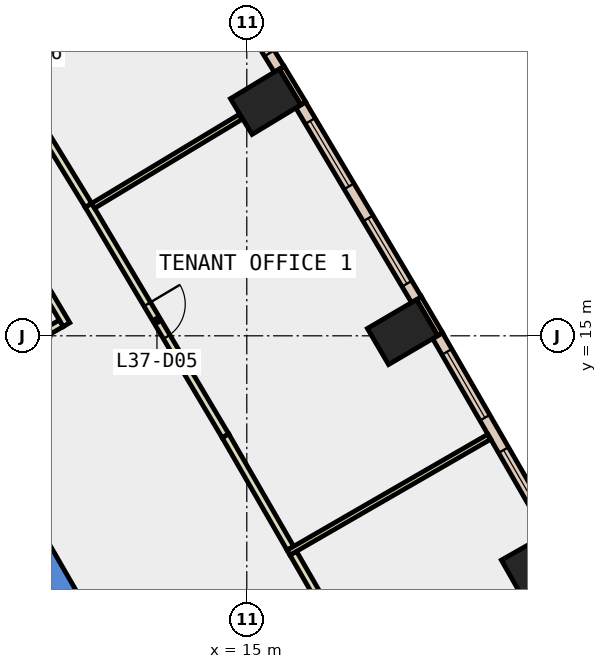
"""IFC4 building model, lengths in metres.
Left out: names, types, materials, properties, quantities, classifications, styles, units other than length and angle.
Written with IfcOpenShell. Run it as: python <this file> out.ifc"""

import sys

from ifc_helpers import new_model, si_unit, direction, frame, frame_2d, origin, origin_2d, place, context, subcontext, project, spatial, polyline, rectangle, outline, extrude, element, fill, save


model = new_model("IFC4")
c1 = context("Model", 3, precision=1e-05, world=origin(), true_north=direction((0.0, 1.0)))
c2 = subcontext(c1, "Body", "Model", "MODEL_VIEW")
j1 = project(units=[si_unit("LENGTHUNIT", "METRE"), si_unit("PLANEANGLEUNIT", "RADIAN")], contexts=[c1])
p1 = place(None, origin())
s1 = spatial("IfcSite", under=j1, at=p1, CompositionType="ELEMENT")
p2 = place(p1, origin())
s2 = spatial("IfcBuilding", under=s1, at=p2, CompositionType="ELEMENT")
p3 = place(p2, frame((0.0, 0.0, 167.6)))
s3 = spatial("IfcBuildingStorey", under=s2, at=p3, CompositionType="ELEMENT", Elevation=167.6)
for number, where, z_axis, x_axis in (
    (1, (22.623, 8.991, -0.4), (0.0, 0.0, 1.0), (-0.494, 0.869, 0.0)),
    (2, (19.099, 15.098, -0.4), (0.0, 0.0, 1.0), (-0.506, 0.863, 0.0)),
    (3, (15.496, 21.158, -0.4), (0.0, 0.0, 1.0), (-0.518, 0.855, 0.0)),
):
    element("IfcColumn", number, at=place(p3, frame(where, z_axis=z_axis, x_axis=x_axis)), inside=s3, PredefinedType="COLUMN", context=c2, shape_type="SweptSolid", body=[
        extrude(rectangle(XDim=1.1, YDim=1.5, at=origin_2d()), origin(), (0.0, 0.0, 1.0), 4.2),
    ])
p4 = place(p3, frame((0.0, 0.0, -0.4)))
e4 = element("IfcWall", 4, at=p4, inside=s3, PredefinedType="SHEAR", context=c2, shape_type="SweptSolid", body=[
    extrude(outline(polyline([(8.517, 11.748), (7.824, 11.348), (12.933, 2.5), (13.856, 2.5), (8.517, 11.748)])), origin(), (0.0, 0.0, 1.0), 4.2),
])
p5 = place(p3, frame((20.089, 15.041, 0.0), z_axis=(0.0, 0.0, 1.0), x_axis=(-0.50667077411, 0.862139621327, 0.0)))
e5 = element("IfcWall", 5, at=p5, inside=s3, PredefinedType="STANDARD", context=c2, shape_type="SweptSolid", body=[
    extrude(rectangle(XDim=1.1, YDim=0.15, at=frame_2d((0.55, 0.0))), origin(), (0.0, 0.0, 1.0), 3.8),
])
p6 = place(p3, frame((16.487, 21.115, 0.0), z_axis=(0.0, 0.0, 1.0), x_axis=(-0.518178754102, 0.855272341888, 0.0)))
e6 = element("IfcWall", 6, at=p6, inside=s3, PredefinedType="STANDARD", context=c2, shape_type="SweptSolid", body=[
    extrude(rectangle(XDim=1.1, YDim=0.15, at=frame_2d((0.55, 0.0))), origin(), (0.0, 0.0, 1.0), 3.8),
])
p7 = place(p3, frame((23.001, 9.837, 0.0), z_axis=(0.0, 0.0, 1.0), x_axis=(-0.49986421087, 0.866103787482, 0.0)))
e7 = element("IfcWall", 7, at=p7, inside=s3, PredefinedType="STANDARD", context=c2, shape_type="SweptSolid", body=[
    extrude(rectangle(XDim=5.964, YDim=0.3, at=frame_2d((2.982, 0.0))), origin(), (0.0, 0.0, 1.0), 3.8),
])
p8 = place(p7, frame((0.491, 0.0, 0.9)))
e8 = element("IfcOpeningElement", 8, at=p8, cuts=e7, PredefinedType="OPENING", context=c2, shape_type="SweptSolid", body=[
    extrude(rectangle(XDim=2.0, YDim=2.6, at=frame_2d((1.0, 1.3))), frame((0.0, 0.16, 0.0), z_axis=(0.0, -1.0, 0.0), x_axis=(1.0, 0.0, 0.0)), (0.0, 0.0, 1.0), 0.32),
])
p9 = place(p7, frame((3.473, 0.0, 0.9)))
e9 = element("IfcOpeningElement", 9, at=p9, cuts=e7, PredefinedType="OPENING", context=c2, shape_type="SweptSolid", body=[
    extrude(rectangle(XDim=2.0, YDim=2.6, at=frame_2d((1.0, 1.3))), frame((0.0, 0.16, 0.0), z_axis=(0.0, -1.0, 0.0), x_axis=(1.0, 0.0, 0.0)), (0.0, 0.0, 1.0), 0.32),
])
p10 = place(p3, frame((19.465, 15.949, 0.0), z_axis=(0.0, 0.0, 1.0), x_axis=(-0.511053317394, 0.8595490136, 0.0)))
e10 = element("IfcWall", 10, at=p10, inside=s3, PredefinedType="STANDARD", context=c2, shape_type="SweptSolid", body=[
    extrude(rectangle(XDim=5.962, YDim=0.3, at=frame_2d((2.981, 0.0))), origin(), (0.0, 0.0, 1.0), 3.8),
])
p11 = place(p10, frame((0.491, 0.0, 0.9)))
e11 = element("IfcOpeningElement", 11, at=p11, cuts=e10, PredefinedType="OPENING", context=c2, shape_type="SweptSolid", body=[
    extrude(rectangle(XDim=2.0, YDim=2.6, at=frame_2d((1.0, 1.3))), frame((0.0, 0.16, 0.0), z_axis=(0.0, -1.0, 0.0), x_axis=(1.0, 0.0, 0.0)), (0.0, 0.0, 1.0), 0.32),
])
p12 = place(p10, frame((3.472, 0.0, 0.9)))
e12 = element("IfcOpeningElement", 12, at=p12, cuts=e10, PredefinedType="OPENING", context=c2, shape_type="SweptSolid", body=[
    extrude(rectangle(XDim=2.0, YDim=2.6, at=frame_2d((1.0, 1.3))), frame((0.0, 0.16, 0.0), z_axis=(0.0, -1.0, 0.0), x_axis=(1.0, 0.0, 0.0)), (0.0, 0.0, 1.0), 0.32),
])
p13 = place(p3, frame((15.851, 22.015, 0.0), z_axis=(0.0, 0.0, 1.0), x_axis=(-0.522156898008, 0.852849443842, 0.0)))
e13 = element("IfcWall", 13, at=p13, inside=s3, PredefinedType="STANDARD", context=c2, shape_type="SweptSolid", body=[
    extrude(rectangle(XDim=5.964, YDim=0.3, at=frame_2d((2.982, 0.0))), origin(), (0.0, 0.0, 1.0), 3.8),
])
p14 = place(p13, frame((0.491, 0.0, 0.9)))
e14 = element("IfcOpeningElement", 14, at=p14, cuts=e13, PredefinedType="OPENING", context=c2, shape_type="SweptSolid", body=[
    extrude(rectangle(XDim=2.0, YDim=2.6, at=frame_2d((1.0, 1.3))), frame((0.0, 0.16, 0.0), z_axis=(0.0, -1.0, 0.0), x_axis=(1.0, 0.0, 0.0)), (0.0, 0.0, 1.0), 0.32),
])
p15 = place(p13, frame((3.473, 0.0, 0.9)))
e15 = element("IfcOpeningElement", 15, at=p15, cuts=e13, PredefinedType="OPENING", context=c2, shape_type="SweptSolid", body=[
    extrude(rectangle(XDim=2.0, YDim=2.6, at=frame_2d((1.0, 1.3))), frame((0.0, 0.16, 0.0), z_axis=(0.0, -1.0, 0.0), x_axis=(1.0, 0.0, 0.0)), (0.0, 0.0, 1.0), 0.32),
])
p16 = place(p3, frame((9.809, 15.15, 0.0), z_axis=(0.0, 0.0, 1.0), x_axis=(0.866479829667, 0.499212083968, 0.0)))
e16 = element("IfcWall", 16, at=p16, inside=s3, PredefinedType="PARTITIONING", context=c2, shape_type="SweptSolid", body=[
    extrude(rectangle(XDim=0.359, YDim=0.2, at=frame_2d((0.179, 0.0))), origin(), (0.0, 0.0, 1.0), 3.8),
])
p17 = place(p3, frame((10.257, 15.293, 0.0), z_axis=(0.0, 0.0, 1.0), x_axis=(-0.510974411771, 0.859595922812, 0.0)))
e17 = element("IfcWall", 17, at=p17, inside=s3, PredefinedType="PARTITIONING", context=c2, shape_type="SweptSolid", body=[
    extrude(rectangle(XDim=2.317, YDim=0.2, at=frame_2d((1.159, 0.0))), origin(), (0.0, 0.0, 1.0), 3.8),
])
p18 = place(p3, frame((16.222, 9.28, 0.0), z_axis=(0.0, 0.0, 1.0), x_axis=(0.499920397431, -0.866071357471, 0.0)))
e18 = element("IfcWall", 18, at=p18, inside=s3, PredefinedType="PARTITIONING", context=c2, shape_type="SweptSolid", body=[
    extrude(rectangle(XDim=3.417, YDim=0.2, at=frame_2d((1.708, 0.0))), origin(), (0.0, 0.0, 1.0), 3.8),
])
p19 = place(p3, frame((10.833, 18.434, 0.0), z_axis=(0.0, 0.0, 1.0), x_axis=(0.510975915649, -0.859595028852, 0.0)))
e19 = element("IfcWall", 19, at=p19, inside=s3, PredefinedType="PARTITIONING", context=c2, shape_type="SweptSolid", body=[
    extrude(rectangle(XDim=7.057, YDim=0.2, at=frame_2d((3.528, 0.0))), origin(), (0.0, 0.0, 1.0), 3.8),
])
p20 = place(p19, frame((3.028, 0.0, 0.0)))
e20 = element("IfcOpeningElement", 20, at=p20, cuts=e19, PredefinedType="OPENING", context=c2, shape_type="SweptSolid", body=[
    extrude(rectangle(XDim=1.0, YDim=2.1, at=frame_2d((0.5, 1.05))), frame((0.0, 0.11, 0.0), z_axis=(0.0, -1.0, 0.0), x_axis=(1.0, 0.0, 0.0)), (0.0, 0.0, 1.0), 0.22),
])
p21 = place(p3, frame((14.439, 12.368, 0.0), z_axis=(0.0, 0.0, 1.0), x_axis=(0.500044178772, -0.865999895656, 0.0)))
e21 = element("IfcWall", 21, at=p21, inside=s3, PredefinedType="PARTITIONING", context=c2, shape_type="SweptSolid", body=[
    extrude(rectangle(XDim=3.416, YDim=0.2, at=frame_2d((1.708, 0.0))), origin(), (0.0, 0.0, 1.0), 3.8),
])
p22 = place(p3, frame((7.226, 24.326, 0.0), z_axis=(0.0, 0.0, 1.0), x_axis=(0.52212028524, -0.852871858922, 0.0)))
e22 = element("IfcWall", 22, at=p22, inside=s3, PredefinedType="PARTITIONING", context=c2, shape_type="SweptSolid", body=[
    extrude(rectangle(XDim=6.908, YDim=0.2, at=frame_2d((3.454, 0.0))), origin(), (0.0, 0.0, 1.0), 3.8),
])
p23 = place(p22, frame((3.029, 0.0, 0.0)))
e23 = element("IfcOpeningElement", 23, at=p23, cuts=e22, PredefinedType="OPENING", context=c2, shape_type="SweptSolid", body=[
    extrude(rectangle(XDim=1.0, YDim=2.1, at=frame_2d((0.5, 1.05))), frame((0.0, 0.11, 0.0), z_axis=(0.0, -1.0, 0.0), x_axis=(1.0, 0.0, 0.0)), (0.0, 0.0, 1.0), 0.22),
])
p24 = place(p3, frame((16.098, 9.295, 0.0), z_axis=(0.0, 0.0, 1.0), x_axis=(0.866109615698, 0.499854112313, 0.0)))
e24 = element("IfcWall", 24, at=p24, inside=s3, PredefinedType="PARTITIONING", context=c2, shape_type="SweptSolid", body=[
    extrude(rectangle(XDim=6.1, YDim=0.15, at=frame_2d((3.05, 0.0))), origin(), (0.0, 0.0, 1.0), 3.8),
])
p25 = place(p3, frame((10.957, 18.421, 0.0), z_axis=(0.0, 0.0, 1.0), x_axis=(0.85624931053, 0.516562792134, 0.0)))
e25 = element("IfcWall", 25, at=p25, inside=s3, PredefinedType="PARTITIONING", context=c2, shape_type="SweptSolid", body=[
    extrude(rectangle(XDim=4.53, YDim=0.15, at=frame_2d((2.265, 0.0))), origin(), (0.0, 0.0, 1.0), 3.8),
])
p26 = place(p8, origin())
e26 = element("IfcWindow", 26, at=p26, inside=s3, PartitioningType="SINGLE_PANEL", PredefinedType="WINDOW", context=c2, shape_type="SweptSolid", body=[
    extrude(rectangle(XDim=2.0, YDim=2.6, at=frame_2d((1.0, 1.3))), frame((0.0, 0.03, 0.0), z_axis=(0.0, -1.0, 0.0), x_axis=(1.0, 0.0, 0.0)), (0.0, 0.0, 1.0), 0.06),
])
fill(e8, e26)
p27 = place(p9, origin())
e27 = element("IfcWindow", 27, at=p27, inside=s3, PartitioningType="SINGLE_PANEL", PredefinedType="WINDOW", context=c2, shape_type="SweptSolid", body=[
    extrude(rectangle(XDim=2.0, YDim=2.6, at=frame_2d((1.0, 1.3))), frame((0.0, 0.03, 0.0), z_axis=(0.0, -1.0, 0.0), x_axis=(1.0, 0.0, 0.0)), (0.0, 0.0, 1.0), 0.06),
])
fill(e9, e27)
p28 = place(p11, origin())
e28 = element("IfcWindow", 28, at=p28, inside=s3, PartitioningType="SINGLE_PANEL", PredefinedType="WINDOW", context=c2, shape_type="SweptSolid", body=[
    extrude(rectangle(XDim=2.0, YDim=2.6, at=frame_2d((1.0, 1.3))), frame((0.0, 0.03, 0.0), z_axis=(0.0, -1.0, 0.0), x_axis=(1.0, 0.0, 0.0)), (0.0, 0.0, 1.0), 0.06),
])
fill(e11, e28)
p29 = place(p12, origin())
e29 = element("IfcWindow", 29, at=p29, inside=s3, PartitioningType="SINGLE_PANEL", PredefinedType="WINDOW", context=c2, shape_type="SweptSolid", body=[
    extrude(rectangle(XDim=2.0, YDim=2.6, at=frame_2d((1.0, 1.3))), frame((0.0, 0.03, 0.0), z_axis=(0.0, -1.0, 0.0), x_axis=(1.0, 0.0, 0.0)), (0.0, 0.0, 1.0), 0.06),
])
fill(e12, e29)
p30 = place(p14, origin())
e30 = element("IfcWindow", 30, at=p30, inside=s3, PartitioningType="SINGLE_PANEL", PredefinedType="WINDOW", context=c2, shape_type="SweptSolid", body=[
    extrude(rectangle(XDim=2.0, YDim=2.6, at=frame_2d((1.0, 1.3))), frame((0.0, 0.03, 0.0), z_axis=(0.0, -1.0, 0.0), x_axis=(1.0, 0.0, 0.0)), (0.0, 0.0, 1.0), 0.06),
])
fill(e14, e30)
p31 = place(p20, origin())
e31 = element("IfcDoor", 31, at=p31, inside=s3, OperationType="SINGLE_SWING_LEFT", PredefinedType="DOOR", context=c2, shape_type="SweptSolid", body=[
    extrude(rectangle(XDim=1.0, YDim=2.1, at=frame_2d((0.5, 1.05))), frame((0.0, 0.025, 0.0), z_axis=(0.0, -1.0, 0.0), x_axis=(1.0, 0.0, 0.0)), (0.0, 0.0, 1.0), 0.05),
])
fill(e20, e31)
save(model, sys.argv[1])
